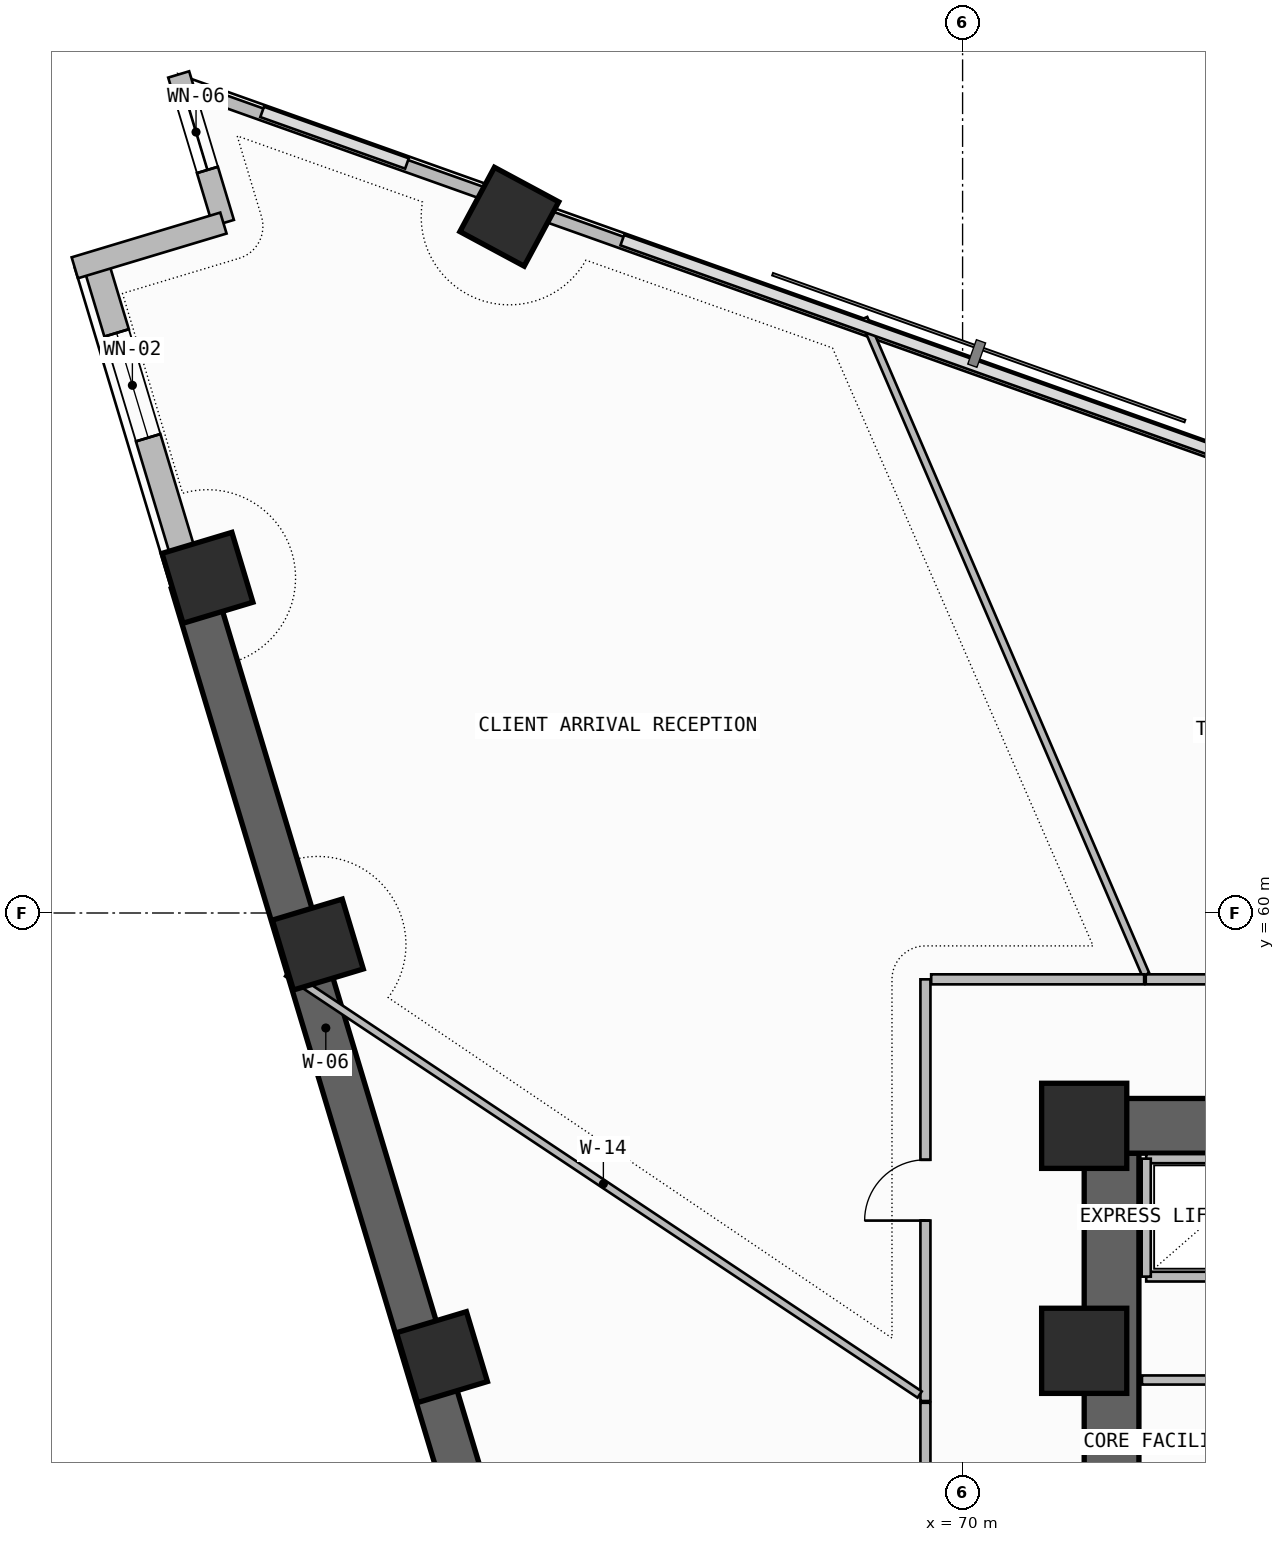
"""IFC4 building model, lengths in metres.
Left out: names, types, materials, properties, quantities, classifications, styles, units other than length and angle.
Written with IfcOpenShell. Run it as: python <this file> out.ifc"""

import sys

from ifc_helpers import new_model, si_unit, direction, frame, frame_2d, origin, origin_2d, place, context, subcontext, project, spatial, rectangle, extrude, element, fill, save


model = new_model("IFC4")
c1 = context("Model", 3, precision=1e-05, world=origin(), true_north=direction((0.0, 1.0)))
c2 = subcontext(c1, "Body", "Model", "MODEL_VIEW")
j1 = project(units=[si_unit("LENGTHUNIT", "METRE"), si_unit("PLANEANGLEUNIT", "RADIAN")], contexts=[c1])
p1 = place(None, origin())
s1 = spatial("IfcSite", under=j1, at=p1, CompositionType="ELEMENT")
p2 = place(p1, origin())
s2 = spatial("IfcBuilding", under=s1, at=p2, CompositionType="ELEMENT")
p3 = place(p2, frame((0.0, 0.0, 135.9)))
s3 = spatial("IfcBuildingStorey", under=s2, at=p3, CompositionType="ELEMENT", Elevation=135.9)
p4 = place(p3, frame((72.45, 43.35, -0.26), z_axis=(0.0, 0.0, 1.0), x_axis=(0.0, 1.0, 0.0)))
e1 = element("IfcWall", 1, at=p4, inside=s3, PredefinedType="SHEAR", context=c2, shape_type="SweptSolid", body=[
    extrude(rectangle(XDim=12.7, YDim=0.9, at=frame_2d((6.35, 0.0))), origin(), (0.0, 0.0, 1.0), 3.6),
])
p5 = place(p4, frame((1.35, 0.0, 0.26)))
e2 = element("IfcOpeningElement", 2, at=p5, cuts=e1, PredefinedType="OPENING", context=c2, shape_type="SweptSolid", body=[
    extrude(rectangle(XDim=1.2, YDim=2.2, at=frame_2d((0.6, 1.1))), frame((0.0, 0.46, 0.0), z_axis=(0.0, -1.0, 0.0), x_axis=(1.0, 0.0, 0.0)), (0.0, 0.0, 1.0), 0.92),
])
p6 = place(p3, frame((72.0, 56.5, -0.26), z_axis=(0.0, 0.0, 1.0), x_axis=(1.0, 0.0, 0.0)))
e3 = element("IfcWall", 3, at=p6, inside=s3, PredefinedType="SHEAR", context=c2, shape_type="SweptSolid", body=[
    extrude(rectangle(XDim=13.9, YDim=0.9, at=frame_2d((6.95, 0.0))), origin(), (0.0, 0.0, 1.0), 3.6),
])
for number, where, z_axis, x_axis in (
    (4, (72.0, 52.8, 0.0), (0.0, 0.0, 1.0), (1.0, 0.0, 0.0)),
    (5, (72.0, 56.5, 0.0), (0.0, 0.0, 1.0), (1.0, 0.0, 0.0)),
):
    element("IfcColumn", number, at=place(p3, frame(where, z_axis=z_axis, x_axis=x_axis)), inside=s3, PredefinedType="COLUMN", context=c2, shape_type="SweptSolid", body=[
        extrude(rectangle(XDim=1.4, YDim=1.4, at=origin_2d()), origin(), (0.0, 0.0, 1.0), 3.6),
    ])
for number, where, z_axis, x_axis in (
    (6, (62.545, 71.45, 0.0), (0.0, 0.0, 1.0), (0.473, 0.881, 0.0)),
    (7, (57.581, 65.512, 0.0), (0.0, 0.0, 1.0), (-0.288, 0.958, 0.0)),
    (8, (59.396, 59.481, 0.0), (0.0, 0.0, 1.0), (-0.288, 0.958, 0.0)),
    (9, (61.438, 52.696, 0.0), (0.0, 0.0, 1.0), (-0.288, 0.958, 0.0)),
):
    element("IfcColumn", number, at=place(p3, frame(where, z_axis=z_axis, x_axis=x_axis)), inside=s3, PredefinedType="COLUMN", context=c2, shape_type="SweptSolid", body=[
        extrude(rectangle(XDim=1.2, YDim=1.2, at=origin_2d()), origin(), (0.0, 0.0, 1.0), 3.6),
    ])
p7 = place(p3, frame((55.734, 70.711, 0.0), z_axis=(0.0, 0.0, 1.0), x_axis=(0.288221590884, -0.957563739157, 0.0)))
e10 = element("IfcWall", 10, at=p7, inside=s3, PredefinedType="SOLIDWALL", context=c2, shape_type="SweptSolid", body=[
    extrude(rectangle(XDim=5.511, YDim=0.42, at=frame_2d((2.755, 0.0))), origin(), (0.0, 0.0, 1.0), 2.725),
])
p8 = place(p7, frame((1.223, 0.0, 1.2)))
e11 = element("IfcOpeningElement", 11, at=p8, cuts=e10, PredefinedType="OPENING", context=c2, shape_type="SweptSolid", body=[
    extrude(rectangle(XDim=1.8, YDim=0.9, at=frame_2d((0.9, 0.45))), frame((0.0, 0.22, 0.0), z_axis=(0.0, -1.0, 0.0), x_axis=(1.0, 0.0, 0.0)), (0.0, 0.0, 1.0), 0.44),
])
p9 = place(p3, frame((57.323, 65.434, -0.26), z_axis=(0.0, 0.0, 1.0), x_axis=(0.288188159352, -0.957573801234, 0.0)))
e12 = element("IfcWall", 12, at=p9, inside=s3, PredefinedType="SHEAR", context=c2, shape_type="SweptSolid", body=[
    extrude(rectangle(XDim=20.469, YDim=0.7, at=frame_2d((10.234, 0.0))), origin(), (0.0, 0.0, 1.0), 3.6),
])
p10 = place(p9, frame((15.3, 0.0, 1.2)))
e13 = element("IfcOpeningElement", 13, at=p10, cuts=e12, PredefinedType="OPENING", context=c2, shape_type="SweptSolid", body=[
    extrude(rectangle(XDim=1.8, YDim=0.9, at=frame_2d((0.9, 0.45))), frame((0.0, 0.36, 0.0), z_axis=(0.0, -1.0, 0.0), x_axis=(1.0, 0.0, 0.0)), (0.0, 0.0, 1.0), 0.72),
])
p11 = place(p3, frame((57.108, 73.79, 0.0), z_axis=(0.0, 0.0, 1.0), x_axis=(0.288198985694, -0.957570542908, 0.0)))
e14 = element("IfcWall", 14, at=p11, inside=s3, PredefinedType="SOLIDWALL", context=c2, shape_type="SweptSolid", body=[
    extrude(rectangle(XDim=2.552, YDim=0.36, at=frame_2d((1.276, 0.0))), origin(), (0.0, 0.0, 1.0), 3.34),
])
p12 = place(p11, frame((0.34, 0.0, 0.45)))
e15 = element("IfcOpeningElement", 15, at=p12, cuts=e14, PredefinedType="OPENING", context=c2, shape_type="SweptSolid", body=[
    extrude(rectangle(XDim=1.3, YDim=2.4, at=frame_2d((0.65, 1.2))), frame((0.0, 0.19, 0.0), z_axis=(0.0, -1.0, 0.0), x_axis=(1.0, 0.0, 0.0)), (0.0, 0.0, 1.0), 0.38),
])
p13 = place(p3, frame((57.843, 71.346, 0.0), z_axis=(0.0, 0.0, 1.0), x_axis=(-0.95757848653, -0.288172590882, 0.0)))
e16 = element("IfcWall", 16, at=p13, inside=s3, PredefinedType="SOLIDWALL", context=c2, shape_type="SweptSolid", body=[
    extrude(rectangle(XDim=2.553, YDim=0.36, at=frame_2d((1.276, 0.0))), origin(), (0.0, 0.0, 1.0), 3.34),
])
p14 = place(p3, frame((89.368, 62.13, 0.0), z_axis=(0.0, 0.0, 1.0), x_axis=(-0.942033439765, 0.335518998515, 0.0)))
e17 = element("IfcWall", 17, at=p14, inside=s3, PredefinedType="PARAPET", context=c2, shape_type="SweptSolid", body=[
    extrude(rectangle(XDim=27.969, YDim=0.2, at=frame_2d((13.985, 0.0))), origin(), (0.0, 0.0, 1.0), 1.15),
])
p15 = place(p3, frame((62.218, 71.801, 0.0), z_axis=(0.0, 0.0, 1.0), x_axis=(-0.942038862895, 0.335503771655, 0.0)))
e18 = element("IfcWall", 18, at=p15, inside=s3, PredefinedType="PARAPET", context=c2, shape_type="SweptSolid", body=[
    extrude(rectangle(XDim=4.942, YDim=0.2, at=frame_2d((2.471, 0.0))), origin(), (0.0, 0.0, 1.0), 1.15),
])
p16 = place(p3, frame((72.95, 52.32, 0.0), z_axis=(0.0, 0.0, 1.0), x_axis=(1.0, 0.0, 0.0)))
e19 = element("IfcWall", 19, at=p16, inside=s3, PredefinedType="SOLIDWALL", context=c2, shape_type="SweptSolid", body=[
    extrude(rectangle(XDim=3.33, YDim=0.15, at=frame_2d((1.665, 0.0))), origin(), (0.0, 0.0, 1.0), 3.34),
])
p17 = place(p3, frame((73.02, 54.02, 0.0), z_axis=(0.0, 0.0, 1.0), x_axis=(1.0, 0.0, 0.0)))
e20 = element("IfcWall", 20, at=p17, inside=s3, PredefinedType="SOLIDWALL", context=c2, shape_type="SweptSolid", body=[
    extrude(rectangle(XDim=12.08, YDim=0.16, at=frame_2d((6.04, 0.0))), origin(), (0.0, 0.0, 1.0), 3.34),
])
p18 = place(p3, frame((73.02, 55.96, 0.0), z_axis=(0.0, 0.0, 1.0), x_axis=(1.0, 0.0, 0.0)))
e21 = element("IfcWall", 21, at=p18, inside=s3, PredefinedType="SOLIDWALL", context=c2, shape_type="SweptSolid", body=[
    extrude(rectangle(XDim=3.5, YDim=0.15, at=frame_2d((1.75, 0.0))), origin(), (0.0, 0.0, 1.0), 3.34),
])
p19 = place(p3, frame((73.02, 54.02, 0.0), z_axis=(0.0, 0.0, 1.0), x_axis=(0.0, 1.0, 0.0)))
e22 = element("IfcWall", 22, at=p19, inside=s3, PredefinedType="PLUMBINGWALL", context=c2, shape_type="SweptSolid", body=[
    extrude(rectangle(XDim=1.94, YDim=0.15, at=frame_2d((0.97, 0.0))), origin(), (0.0, 0.0, 1.0), 3.34),
])
p20 = place(p3, frame((85.818, 58.909, 0.0), z_axis=(0.0, 0.0, 1.0), x_axis=(-1.0, 0.0, 0.0)))
e23 = element("IfcWall", 23, at=p20, inside=s3, PredefinedType="PARTITIONING", context=c2, shape_type="SweptSolid", body=[
    extrude(rectangle(XDim=12.806, YDim=0.165, at=frame_2d((6.403, 0.0))), origin(), (0.0, 0.0, 1.0), 3.34),
])
p21 = place(p20, frame((5.903, 0.0, 0.0)))
e24 = element("IfcOpeningElement", 24, at=p21, cuts=e23, PredefinedType="OPENING", context=c2, shape_type="SweptSolid", body=[
    extrude(rectangle(XDim=1.0, YDim=2.2, at=frame_2d((0.5, 1.1))), frame((0.0, 0.093, 0.0), z_axis=(0.0, -1.0, 0.0), x_axis=(1.0, 0.0, 0.0)), (0.0, 0.0, 1.0), 0.185),
])
p22 = place(p3, frame((73.012, 58.987, 0.0), z_axis=(0.0, 0.0, 1.0), x_axis=(-0.394910032607, 0.918719797406, 0.0)))
e25 = element("IfcWall", 25, at=p22, inside=s3, PredefinedType="PARTITIONING", context=c2, shape_type="SweptSolid", body=[
    extrude(rectangle(XDim=11.745, YDim=0.125, at=frame_2d((5.873, 0.0))), origin(), (0.0, 0.0, 1.0), 3.34),
])
p23 = place(p3, frame((69.389, 58.909, 0.0), z_axis=(0.0, 0.0, 1.0), x_axis=(0.0, -1.0, 0.0)))
e26 = element("IfcWall", 26, at=p23, inside=s3, PredefinedType="PARTITIONING", context=c2, shape_type="SweptSolid", body=[
    extrude(rectangle(XDim=6.935, YDim=0.165, at=frame_2d((3.467, 0.0))), origin(), (0.0, 0.0, 1.0), 2.725),
])
p24 = place(p23, frame((2.967, 0.0, 0.0)))
e27 = element("IfcOpeningElement", 27, at=p24, cuts=e26, PredefinedType="OPENING", context=c2, shape_type="SweptSolid", body=[
    extrude(rectangle(XDim=1.0, YDim=2.2, at=frame_2d((0.5, 1.1))), frame((0.0, 0.093, 0.0), z_axis=(0.0, -1.0, 0.0), x_axis=(1.0, 0.0, 0.0)), (0.0, 0.0, 1.0), 0.185),
])
p25 = place(p3, frame((72.986, 58.909, 0.0), z_axis=(0.0, 0.0, 1.0), x_axis=(-1.0, 0.0, 0.0)))
e28 = element("IfcWall", 28, at=p25, inside=s3, PredefinedType="PARTITIONING", context=c2, shape_type="SweptSolid", body=[
    extrude(rectangle(XDim=3.503, YDim=0.165, at=frame_2d((1.751, 0.0))), origin(), (0.0, 0.0, 1.0), 2.725),
])
p26 = place(p3, frame((69.294, 52.081, 0.0), z_axis=(0.0, 0.0, 1.0), x_axis=(-0.832263553601, 0.554380174021, 0.0)))
e29 = element("IfcWall", 29, at=p26, inside=s3, PredefinedType="PARTITIONING", context=c2, shape_type="SweptSolid", body=[
    extrude(rectangle(XDim=12.501, YDim=0.125, at=frame_2d((6.25, 0.0))), origin(), (0.0, 0.0, 1.0), 2.725),
])
p27 = place(p3, frame((69.389, 51.945, 0.0), z_axis=(0.0, 0.0, 1.0), x_axis=(0.0, -1.0, 0.0)))
e30 = element("IfcWall", 30, at=p27, inside=s3, PredefinedType="PARTITIONING", context=c2, shape_type="SweptSolid", body=[
    extrude(rectangle(XDim=9.273, YDim=0.165, at=frame_2d((4.636, 0.0))), origin(), (0.0, 0.0, 1.0), 2.725),
])
p28 = place(p27, frame((4.136, 0.0, 0.0)))
e31 = element("IfcOpeningElement", 31, at=p28, cuts=e30, PredefinedType="OPENING", context=c2, shape_type="SweptSolid", body=[
    extrude(rectangle(XDim=1.0, YDim=2.2, at=frame_2d((0.5, 1.1))), frame((0.0, 0.093, 0.0), z_axis=(0.0, -1.0, 0.0), x_axis=(1.0, 0.0, 0.0)), (0.0, 0.0, 1.0), 0.185),
])
p29 = place(p8, origin())
e32 = element("IfcWindow", 32, at=p29, inside=s3, PartitioningType="SINGLE_PANEL", PredefinedType="WINDOW", context=c2, shape_type="SweptSolid", body=[
    extrude(rectangle(XDim=1.8, YDim=0.9, at=frame_2d((0.9, 0.45))), frame((0.0, 0.03, 0.0), z_axis=(0.0, -1.0, 0.0), x_axis=(1.0, 0.0, 0.0)), (0.0, 0.0, 1.0), 0.06),
])
fill(e11, e32)
p30 = place(p12, origin())
e33 = element("IfcWindow", 33, at=p30, inside=s3, PartitioningType="SINGLE_PANEL", PredefinedType="WINDOW", context=c2, shape_type="SweptSolid", body=[
    extrude(rectangle(XDim=1.3, YDim=2.4, at=frame_2d((0.65, 1.2))), frame((0.0, 0.03, 0.0), z_axis=(0.0, -1.0, 0.0), x_axis=(1.0, 0.0, 0.0)), (0.0, 0.0, 1.0), 0.06),
])
fill(e15, e33)
p31 = place(p24, frame((1.0, 0.0, 0.0), z_axis=(0.0, 0.0, 1.0), x_axis=(-1.0, 0.0, 0.0)))
e34 = element("IfcDoor", 34, at=p31, inside=s3, OperationType="SINGLE_SWING_LEFT", PredefinedType="DOOR", context=c2, shape_type="SweptSolid", body=[
    extrude(rectangle(XDim=1.0, YDim=2.2, at=frame_2d((0.5, 1.1))), frame((0.0, 0.025, 0.0), z_axis=(0.0, -1.0, 0.0), x_axis=(1.0, 0.0, 0.0)), (0.0, 0.0, 1.0), 0.05),
])
fill(e27, e34)
save(model, sys.argv[1])
